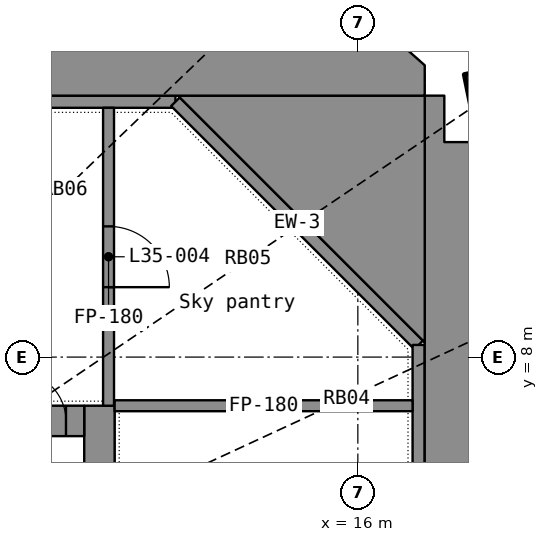
"""IFC4 building model, lengths in metres.
Left out: names, types, materials, properties, quantities, classifications, styles, units other than length and angle.
Written with IfcOpenShell. Run it as: python <this file> out.ifc"""

import sys

from ifc_helpers import new_model, si_unit, direction, frame, frame_2d, origin, origin_2d, place, context, subcontext, project, spatial, polyline, rectangle, hollow_rectangle, outline, extrude, element, fill, save


model = new_model("IFC4")
c1 = context("Model", 3, precision=1e-05, world=origin(), true_north=direction((0.0, 1.0)))
c2 = subcontext(c1, "Body", "Model", "MODEL_VIEW")
j1 = project(units=[si_unit("LENGTHUNIT", "METRE"), si_unit("PLANEANGLEUNIT", "RADIAN")], contexts=[c1])
p1 = place(None, origin())
s1 = spatial("IfcSite", under=j1, at=p1, CompositionType="ELEMENT")
p2 = place(p1, origin())
s2 = spatial("IfcBuilding", under=s1, at=p2, CompositionType="ELEMENT")
p3 = place(p2, frame((0.0, 0.0, 145.2)))
s3 = spatial("IfcBuildingStorey", under=s2, at=p3, CompositionType="ELEMENT", Elevation=145.2)
p4 = place(p3, frame((18.222, 12.336, 0.0), z_axis=(-0.026511305, -0.018201791, 0.999482789), x_axis=(0.720044306, -0.693898, 0.00646247)))
e1 = element("IfcColumn", 1, at=p4, inside=s3, PredefinedType="COLUMN", context=c2, shape_type="SweptSolid", body=[
    extrude(hollow_rectangle(XDim=0.8, YDim=0.8, WallThickness=0.025, at=origin_2d()), origin(), (0.0, 0.0, 1.0), 7.404),
])
p5 = place(p3, frame((-13.0, 12.2, 0.08), z_axis=(0.0, 0.0, 1.0), x_axis=(1.0, 0.0, 0.0)))
e2 = element("IfcWall", 2, at=p5, inside=s3, PredefinedType="STANDARD", context=c2, shape_type="SweptSolid", body=[
    extrude(rectangle(XDim=26.0, YDim=0.2, at=frame_2d((13.0, 0.0))), origin(), (0.0, 0.0, 1.0), 7.12),
])
p6 = place(p5, frame((7.1, 0.0, 0.0)))
e3 = element("IfcOpeningElement", 3, at=p6, cuts=e2, PredefinedType="OPENING", context=c2, shape_type="SweptSolid", body=[
    extrude(rectangle(XDim=1.8, YDim=2.4, at=frame_2d((0.9, 1.2))), frame((0.0, 0.11, 0.0), z_axis=(0.0, -1.0, 0.0), x_axis=(1.0, 0.0, 0.0)), (0.0, 0.0, 1.0), 0.22),
])
p7 = place(p5, frame((17.1, 0.0, 0.0)))
e4 = element("IfcOpeningElement", 4, at=p7, cuts=e2, PredefinedType="OPENING", context=c2, shape_type="SweptSolid", body=[
    extrude(rectangle(XDim=1.8, YDim=2.4, at=frame_2d((0.9, 1.2))), frame((0.0, 0.11, 0.0), z_axis=(0.0, -1.0, 0.0), x_axis=(1.0, 0.0, 0.0)), (0.0, 0.0, 1.0), 0.22),
])
p8 = place(p5, frame((3.3, 0.0, 0.9)))
e5 = element("IfcOpeningElement", 5, at=p8, cuts=e2, PredefinedType="OPENING", context=c2, shape_type="SweptSolid", body=[
    extrude(rectangle(XDim=2.4, YDim=1.5, at=frame_2d((1.2, 0.75))), frame((0.0, 0.11, 0.0), z_axis=(0.0, -1.0, 0.0), x_axis=(1.0, 0.0, 0.0)), (0.0, 0.0, 1.0), 0.22),
])
p9 = place(p5, frame((11.8, 0.0, 0.9)))
e6 = element("IfcOpeningElement", 6, at=p9, cuts=e2, PredefinedType="OPENING", context=c2, shape_type="SweptSolid", body=[
    extrude(rectangle(XDim=2.4, YDim=1.5, at=frame_2d((1.2, 0.75))), frame((0.0, 0.11, 0.0), z_axis=(0.0, -1.0, 0.0), x_axis=(1.0, 0.0, 0.0)), (0.0, 0.0, 1.0), 0.22),
])
p10 = place(p5, frame((20.3, 0.0, 0.9)))
e7 = element("IfcOpeningElement", 7, at=p10, cuts=e2, PredefinedType="OPENING", context=c2, shape_type="SweptSolid", body=[
    extrude(rectangle(XDim=2.4, YDim=1.5, at=frame_2d((1.2, 0.75))), frame((0.0, 0.11, 0.0), z_axis=(0.0, -1.0, 0.0), x_axis=(1.0, 0.0, 0.0)), (0.0, 0.0, 1.0), 0.22),
])
p11 = place(p5, frame((6.5, 0.0, 3.2)))
e8 = element("IfcOpeningElement", 8, at=p11, cuts=e2, PredefinedType="OPENING", context=c2, shape_type="SweptSolid", body=[
    extrude(rectangle(XDim=3.0, YDim=1.0, at=frame_2d((1.5, 0.5))), frame((0.0, 0.11, 0.0), z_axis=(0.0, -1.0, 0.0), x_axis=(1.0, 0.0, 0.0)), (0.0, 0.0, 1.0), 0.22),
])
p12 = place(p5, frame((16.5, 0.0, 3.2)))
e9 = element("IfcOpeningElement", 9, at=p12, cuts=e2, PredefinedType="OPENING", context=c2, shape_type="SweptSolid", body=[
    extrude(rectangle(XDim=3.0, YDim=1.0, at=frame_2d((1.5, 0.5))), frame((0.0, 0.11, 0.0), z_axis=(0.0, -1.0, 0.0), x_axis=(1.0, 0.0, 0.0)), (0.0, 0.0, 1.0), 0.22),
])
p13 = place(p3, frame((13.0, 12.2, 0.08), z_axis=(0.0, 0.0, 1.0), x_axis=(0.707106781, -0.707106781, 0.0)))
e10 = element("IfcWall", 10, at=p13, inside=s3, PredefinedType="STANDARD", context=c2, shape_type="SweptSolid", body=[
    extrude(rectangle(XDim=5.657, YDim=0.2, at=frame_2d((2.828, 0.0))), origin(), (0.0, 0.0, 1.0), 7.12),
])
p14 = place(p3, frame((17.0, 8.2, 0.08), z_axis=(0.0, 0.0, 1.0), x_axis=(0.0, -1.0, 0.0)))
e11 = element("IfcWall", 11, at=p14, inside=s3, PredefinedType="STANDARD", context=c2, shape_type="SweptSolid", body=[
    extrude(rectangle(XDim=16.4, YDim=0.2, at=frame_2d((8.2, 0.0))), origin(), (0.0, 0.0, 1.0), 7.12),
])
p15 = place(p14, frame((7.3, 0.0, 0.0)))
e12 = element("IfcOpeningElement", 12, at=p15, cuts=e11, PredefinedType="OPENING", context=c2, shape_type="SweptSolid", body=[
    extrude(rectangle(XDim=1.8, YDim=2.4, at=frame_2d((0.9, 1.2))), frame((0.0, 0.11, 0.0), z_axis=(0.0, -1.0, 0.0), x_axis=(1.0, 0.0, 0.0)), (0.0, 0.0, 1.0), 0.22),
])
p16 = place(p14, frame((3.4, 0.0, 0.1)))
e13 = element("IfcOpeningElement", 13, at=p16, cuts=e11, PredefinedType="OPENING", context=c2, shape_type="SweptSolid", body=[
    extrude(rectangle(XDim=1.2, YDim=2.2, at=frame_2d((0.6, 1.1))), frame((0.0, 0.11, 0.0), z_axis=(0.0, -1.0, 0.0), x_axis=(1.0, 0.0, 0.0)), (0.0, 0.0, 1.0), 0.22),
])
p17 = place(p14, frame((11.8, 0.0, 0.1)))
e14 = element("IfcOpeningElement", 14, at=p17, cuts=e11, PredefinedType="OPENING", context=c2, shape_type="SweptSolid", body=[
    extrude(rectangle(XDim=1.2, YDim=2.2, at=frame_2d((0.6, 1.1))), frame((0.0, 0.11, 0.0), z_axis=(0.0, -1.0, 0.0), x_axis=(1.0, 0.0, 0.0)), (0.0, 0.0, 1.0), 0.22),
])
p18 = place(p3, frame((0.0, 0.0, -0.4)))
e15 = element("IfcWall", 15, at=p18, inside=s3, PredefinedType="ELEMENTEDWALL", context=c2, shape_type="SweptSolid", body=[
    extrude(outline(polyline([(17.422, 12.3), (17.1, 12.3), (17.1, 8.241), (17.1, 0.9), (22.392, 0.9), (22.392, 1.025), (23.248, 1.025), (23.214, 1.646), (23.072, 2.519), (22.562, 2.519), (22.562, 4.119), (22.719, 4.119), (22.509, 4.886), (22.175, 5.744), (21.507, 5.744), (21.507, 7.221), (21.119, 7.979), (20.86, 8.382), (19.308, 8.382), (19.308, 10.432), (19.4, 10.432), (19.088, 10.829), (18.419, 11.536), (17.422, 11.536), (17.422, 12.3)])), origin(), (0.0, 0.0, 1.0), 1.58),
])
p19 = place(p3, frame((0.0, 0.0, -0.4)))
e16 = element("IfcWall", 16, at=p19, inside=s3, PredefinedType="ELEMENTEDWALL", context=c2, shape_type="SweptSolid", body=[
    extrude(outline(polyline([(17.1, 8.241), (17.1, 12.3), (13.042, 12.3), (17.1, 8.241)])), origin(), (0.0, 0.0, 1.0), 1.58),
])
p20 = place(p3, frame((0.0, 0.0, -0.4)))
e17 = element("IfcWall", 17, at=p20, inside=s3, PredefinedType="ELEMENTEDWALL", context=c2, shape_type="SweptSolid", body=[
    extrude(outline(polyline([(7.357, 17.898), (6.031, 18.236), (5.9, 18.26), (5.9, 12.3), (13.042, 12.3), (17.1, 12.3), (17.1, 12.8), (16.478, 13.35), (15.704, 13.924), (14.506, 13.924), (14.506, 14.757), (13.366, 15.465), (12.813, 15.75), (12.813, 15.372), (10.763, 15.372), (10.763, 16.725), (9.848, 17.111), (8.957, 17.41), (8.957, 17.304), (7.357, 17.304), (7.357, 17.898)])), origin(), (0.0, 0.0, 1.0), 1.58),
])
p21 = place(p3, frame((11.75, -7.2, 0.0), z_axis=(0.0, 0.0, 1.0), x_axis=(0.0, 1.0, 0.0)))
e18 = element("IfcWall", 18, at=p21, inside=s3, PredefinedType="SHEAR", context=c2, shape_type="SweptSolid", body=[
    extrude(rectangle(XDim=14.4, YDim=0.5, at=frame_2d((7.2, 0.0))), origin(), (0.0, 0.0, 1.0), 7.0),
])
p22 = place(p21, frame((6.5, 0.0, 0.0)))
e19 = element("IfcOpeningElement", 19, at=p22, cuts=e18, PredefinedType="OPENING", context=c2, shape_type="SweptSolid", body=[
    extrude(rectangle(XDim=1.4, YDim=2.2, at=frame_2d((0.7, 1.1))), frame((0.0, 0.26, 0.0), z_axis=(0.0, -1.0, 0.0), x_axis=(1.0, 0.0, 0.0)), (0.0, 0.0, 1.0), 0.52),
])
p23 = place(p3, frame((-11.5, 6.95, 0.0), z_axis=(0.0, 0.0, 1.0), x_axis=(1.0, 0.0, 0.0)))
e20 = element("IfcWall", 20, at=p23, inside=s3, PredefinedType="SHEAR", context=c2, shape_type="SweptSolid", body=[
    extrude(rectangle(XDim=23.0, YDim=0.5, at=frame_2d((11.5, 0.0))), origin(), (0.0, 0.0, 1.0), 7.0),
])
p24 = place(p23, frame((1.95, 0.0, 0.0)))
e21 = element("IfcOpeningElement", 21, at=p24, cuts=e20, PredefinedType="OPENING", context=c2, shape_type="SweptSolid", body=[
    extrude(rectangle(XDim=1.1, YDim=2.2, at=frame_2d((0.55, 1.1))), frame((0.0, 0.26, 0.0), z_axis=(0.0, -1.0, 0.0), x_axis=(1.0, 0.0, 0.0)), (0.0, 0.0, 1.0), 0.52),
])
p25 = place(p23, frame((3.95, 0.0, 0.0)))
e22 = element("IfcOpeningElement", 22, at=p25, cuts=e20, PredefinedType="OPENING", context=c2, shape_type="SweptSolid", body=[
    extrude(rectangle(XDim=1.1, YDim=2.2, at=frame_2d((0.55, 1.1))), frame((0.0, 0.26, 0.0), z_axis=(0.0, -1.0, 0.0), x_axis=(1.0, 0.0, 0.0)), (0.0, 0.0, 1.0), 0.52),
])
p26 = place(p23, frame((5.95, 0.0, 0.0)))
e23 = element("IfcOpeningElement", 23, at=p26, cuts=e20, PredefinedType="OPENING", context=c2, shape_type="SweptSolid", body=[
    extrude(rectangle(XDim=1.1, YDim=2.2, at=frame_2d((0.55, 1.1))), frame((0.0, 0.26, 0.0), z_axis=(0.0, -1.0, 0.0), x_axis=(1.0, 0.0, 0.0)), (0.0, 0.0, 1.0), 0.52),
])
p27 = place(p23, frame((7.95, 0.0, 0.0)))
e24 = element("IfcOpeningElement", 24, at=p27, cuts=e20, PredefinedType="OPENING", context=c2, shape_type="SweptSolid", body=[
    extrude(rectangle(XDim=1.1, YDim=2.2, at=frame_2d((0.55, 1.1))), frame((0.0, 0.26, 0.0), z_axis=(0.0, -1.0, 0.0), x_axis=(1.0, 0.0, 0.0)), (0.0, 0.0, 1.0), 0.52),
])
p28 = place(p23, frame((9.95, 0.0, 0.0)))
e25 = element("IfcOpeningElement", 25, at=p28, cuts=e20, PredefinedType="OPENING", context=c2, shape_type="SweptSolid", body=[
    extrude(rectangle(XDim=1.1, YDim=2.2, at=frame_2d((0.55, 1.1))), frame((0.0, 0.26, 0.0), z_axis=(0.0, -1.0, 0.0), x_axis=(1.0, 0.0, 0.0)), (0.0, 0.0, 1.0), 0.52),
])
p29 = place(p23, frame((11.95, 0.0, 0.0)))
e26 = element("IfcOpeningElement", 26, at=p29, cuts=e20, PredefinedType="OPENING", context=c2, shape_type="SweptSolid", body=[
    extrude(rectangle(XDim=1.1, YDim=2.2, at=frame_2d((0.55, 1.1))), frame((0.0, 0.26, 0.0), z_axis=(0.0, -1.0, 0.0), x_axis=(1.0, 0.0, 0.0)), (0.0, 0.0, 1.0), 0.52),
])
p30 = place(p23, frame((13.95, 0.0, 0.0)))
e27 = element("IfcOpeningElement", 27, at=p30, cuts=e20, PredefinedType="OPENING", context=c2, shape_type="SweptSolid", body=[
    extrude(rectangle(XDim=1.1, YDim=2.2, at=frame_2d((0.55, 1.1))), frame((0.0, 0.26, 0.0), z_axis=(0.0, -1.0, 0.0), x_axis=(1.0, 0.0, 0.0)), (0.0, 0.0, 1.0), 0.52),
])
p31 = place(p23, frame((15.95, 0.0, 0.0)))
e28 = element("IfcOpeningElement", 28, at=p31, cuts=e20, PredefinedType="OPENING", context=c2, shape_type="SweptSolid", body=[
    extrude(rectangle(XDim=1.1, YDim=2.2, at=frame_2d((0.55, 1.1))), frame((0.0, 0.26, 0.0), z_axis=(0.0, -1.0, 0.0), x_axis=(1.0, 0.0, 0.0)), (0.0, 0.0, 1.0), 0.52),
])
p32 = place(p23, frame((17.95, 0.0, 0.0)))
e29 = element("IfcOpeningElement", 29, at=p32, cuts=e20, PredefinedType="OPENING", context=c2, shape_type="SweptSolid", body=[
    extrude(rectangle(XDim=1.1, YDim=2.2, at=frame_2d((0.55, 1.1))), frame((0.0, 0.26, 0.0), z_axis=(0.0, -1.0, 0.0), x_axis=(1.0, 0.0, 0.0)), (0.0, 0.0, 1.0), 0.52),
])
p33 = place(p23, frame((19.95, 0.0, 0.0)))
e30 = element("IfcOpeningElement", 30, at=p33, cuts=e20, PredefinedType="OPENING", context=c2, shape_type="SweptSolid", body=[
    extrude(rectangle(XDim=1.1, YDim=2.2, at=frame_2d((0.55, 1.1))), frame((0.0, 0.26, 0.0), z_axis=(0.0, -1.0, 0.0), x_axis=(1.0, 0.0, 0.0)), (0.0, 0.0, 1.0), 0.52),
])
p34 = place(p23, frame((0.3, 0.0, 0.0)))
e31 = element("IfcOpeningElement", 31, at=p34, cuts=e20, PredefinedType="OPENING", context=c2, shape_type="SweptSolid", body=[
    extrude(rectangle(XDim=0.8, YDim=2.05, at=frame_2d((0.4, 1.025))), frame((0.0, 0.26, 0.0), z_axis=(0.0, -1.0, 0.0), x_axis=(1.0, 0.0, 0.0)), (0.0, 0.0, 1.0), 0.52),
])
p35 = place(p23, frame((21.9, 0.0, 0.0)))
e32 = element("IfcOpeningElement", 32, at=p35, cuts=e20, PredefinedType="OPENING", context=c2, shape_type="SweptSolid", body=[
    extrude(rectangle(XDim=0.8, YDim=2.05, at=frame_2d((0.4, 1.025))), frame((0.0, 0.26, 0.0), z_axis=(0.0, -1.0, 0.0), x_axis=(1.0, 0.0, 0.0)), (0.0, 0.0, 1.0), 0.52),
])
p36 = place(p3, frame((11.9, 12.1, 0.0), z_axis=(0.0, 0.0, 1.0), x_axis=(0.0, -1.0, 0.0)))
e33 = element("IfcWall", 33, at=p36, inside=s3, PredefinedType="PARTITIONING", context=c2, shape_type="SweptSolid", body=[
    extrude(rectangle(XDim=4.9, YDim=0.18, at=frame_2d((2.45, 0.0))), origin(), (0.0, 0.0, 1.0), 6.1),
])
p37 = place(p36, frame((1.95, 0.0, 0.0)))
e34 = element("IfcOpeningElement", 34, at=p37, cuts=e33, PredefinedType="OPENING", context=c2, shape_type="SweptSolid", body=[
    extrude(rectangle(XDim=1.0, YDim=2.1, at=frame_2d((0.5, 1.05))), frame((0.0, 0.1, 0.0), z_axis=(0.0, -1.0, 0.0), x_axis=(1.0, 0.0, 0.0)), (0.0, 0.0, 1.0), 0.2),
])
p38 = place(p3, frame((12.0, 7.2, 0.0), z_axis=(0.0, 0.0, 1.0), x_axis=(1.0, 0.0, 0.0)))
e35 = element("IfcWall", 35, at=p38, inside=s3, PredefinedType="PARTITIONING", context=c2, shape_type="SweptSolid", body=[
    extrude(rectangle(XDim=4.9, YDim=0.18, at=frame_2d((2.45, 0.0))), origin(), (0.0, 0.0, 1.0), 6.1),
])
p39 = place(p35, origin())
e36 = element("IfcDoor", 36, at=p39, inside=s3, OperationType="SINGLE_SWING_LEFT", PredefinedType="DOOR", context=c2, shape_type="SweptSolid", body=[
    extrude(rectangle(XDim=0.8, YDim=2.05, at=frame_2d((0.4, 1.025))), frame((0.0, 0.025, 0.0), z_axis=(0.0, -1.0, 0.0), x_axis=(1.0, 0.0, 0.0)), (0.0, 0.0, 1.0), 0.05),
])
fill(e32, e36)
p40 = place(p37, origin())
e37 = element("IfcDoor", 37, at=p40, inside=s3, OperationType="SINGLE_SWING_RIGHT", PredefinedType="DOOR", context=c2, shape_type="SweptSolid", body=[
    extrude(rectangle(XDim=1.0, YDim=2.1, at=frame_2d((0.5, 1.05))), frame((0.0, 0.025, 0.0), z_axis=(0.0, -1.0, 0.0), x_axis=(1.0, 0.0, 0.0)), (0.0, 0.0, 1.0), 0.05),
])
fill(e34, e37)
save(model, sys.argv[1])
